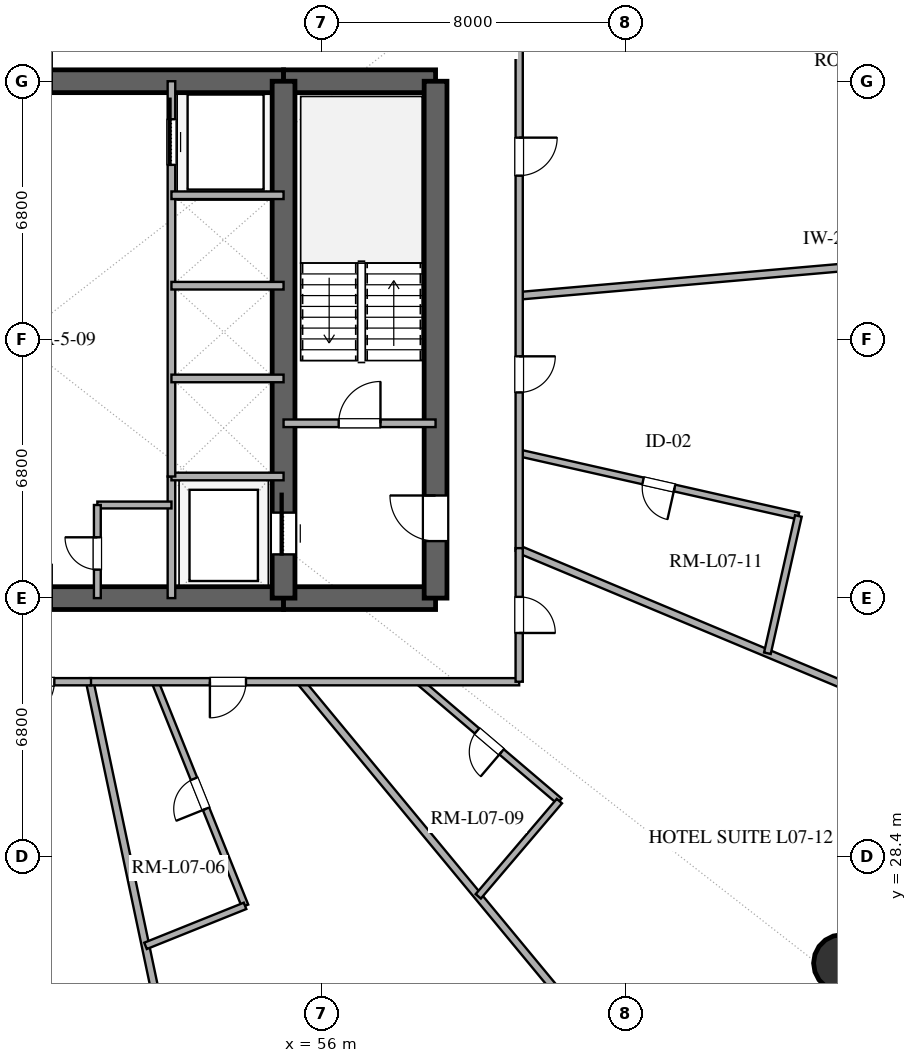
"""IFC4 building model, lengths in metres.
Left out: names, types, materials, properties, quantities, classifications, styles, units other than length and angle.
Written with IfcOpenShell. Run it as: python <this file> out.ifc"""

import sys

from ifc_helpers import new_model, si_unit, direction, frame, frame_2d, origin, origin_2d, place, context, subcontext, project, spatial, rectangle, hollow_circle, extrude, element, fill, save


model = new_model("IFC4")
c1 = context("Model", 3, precision=1e-05, world=origin(), true_north=direction((0.0, 1.0)))
c2 = subcontext(c1, "Body", "Model", "MODEL_VIEW")
j1 = project(units=[si_unit("LENGTHUNIT", "METRE"), si_unit("PLANEANGLEUNIT", "RADIAN")], contexts=[c1])
p1 = place(None, origin())
s1 = spatial("IfcSite", under=j1, at=p1, CompositionType="ELEMENT")
p2 = place(p1, origin())
s2 = spatial("IfcBuilding", under=s1, at=p2, CompositionType="ELEMENT")
p3 = place(p2, frame((0.0, 0.0, 35.4)))
s3 = spatial("IfcBuildingStorey", under=s2, at=p3, CompositionType="ELEMENT", Elevation=35.4)
p4 = place(p3, frame((41.0, 35.2, 0.0), z_axis=(0.0, 0.0, 1.0), x_axis=(1.0, 0.0, 0.0)))
e1 = element("IfcWall", 1, at=p4, inside=s3, PredefinedType="SHEAR", context=c2, shape_type="SweptSolid", body=[
    extrude(rectangle(XDim=14.0, YDim=0.6, at=frame_2d((7.0, 0.0))), origin(), (0.0, 0.0, 1.0), 3.38),
])
p5 = place(p4, frame((6.1, 0.0, 0.0)))
e2 = element("IfcOpeningElement", 2, at=p5, cuts=e1, PredefinedType="OPENING", context=c2, shape_type="SweptSolid", body=[
    extrude(rectangle(XDim=1.8, YDim=2.25, at=frame_2d((0.9, 1.125))), frame((0.0, 0.31, 0.0), z_axis=(0.0, -1.0, 0.0), x_axis=(1.0, 0.0, 0.0)), (0.0, 0.0, 1.0), 0.62),
])
p6 = place(p3, frame((55.0, 35.2, 0.0), z_axis=(0.0, 0.0, 1.0), x_axis=(1.0, 0.0, 0.0)))
e3 = element("IfcWall", 3, at=p6, inside=s3, PredefinedType="SHEAR", context=c2, shape_type="SweptSolid", body=[
    extrude(rectangle(XDim=4.0, YDim=0.6, at=frame_2d((2.0, 0.0))), origin(), (0.0, 0.0, 1.0), 3.38),
])
p7 = place(p3, frame((41.0, 48.8, 0.0), z_axis=(0.0, 0.0, 1.0), x_axis=(1.0, 0.0, 0.0)))
e4 = element("IfcWall", 4, at=p7, inside=s3, PredefinedType="SHEAR", context=c2, shape_type="SweptSolid", body=[
    extrude(rectangle(XDim=14.0, YDim=0.6, at=frame_2d((7.0, 0.0))), origin(), (0.0, 0.0, 1.0), 3.38),
])
p8 = place(p7, frame((6.1, 0.0, 0.0)))
e5 = element("IfcOpeningElement", 5, at=p8, cuts=e4, PredefinedType="OPENING", context=c2, shape_type="SweptSolid", body=[
    extrude(rectangle(XDim=1.8, YDim=2.25, at=frame_2d((0.9, 1.125))), frame((0.0, 0.31, 0.0), z_axis=(0.0, -1.0, 0.0), x_axis=(1.0, 0.0, 0.0)), (0.0, 0.0, 1.0), 0.62),
])
p9 = place(p3, frame((55.0, 48.8, 0.0), z_axis=(0.0, 0.0, 1.0), x_axis=(1.0, 0.0, 0.0)))
e6 = element("IfcWall", 6, at=p9, inside=s3, PredefinedType="SHEAR", context=c2, shape_type="SweptSolid", body=[
    extrude(rectangle(XDim=4.0, YDim=0.6, at=frame_2d((2.0, 0.0))), origin(), (0.0, 0.0, 1.0), 3.38),
])
p10 = place(p3, frame((59.0, 35.2, 0.0), z_axis=(0.0, 0.0, 1.0), x_axis=(0.0, 1.0, 0.0)))
e7 = element("IfcWall", 7, at=p10, inside=s3, PredefinedType="SHEAR", context=c2, shape_type="SweptSolid", body=[
    extrude(rectangle(XDim=13.6, YDim=0.6, at=frame_2d((6.8, 0.0))), origin(), (0.0, 0.0, 1.0), 3.38),
])
p11 = place(p10, frame((1.5, 0.0, 0.0)))
e8 = element("IfcOpeningElement", 8, at=p11, cuts=e7, PredefinedType="OPENING", context=c2, shape_type="SweptSolid", body=[
    extrude(rectangle(XDim=1.2, YDim=2.15, at=frame_2d((0.6, 1.075))), frame((0.0, 0.31, 0.0), z_axis=(0.0, -1.0, 0.0), x_axis=(1.0, 0.0, 0.0)), (0.0, 0.0, 1.0), 0.62),
])
p12 = place(p3, frame((55.0, 35.2, 0.0), z_axis=(0.0, 0.0, 1.0), x_axis=(0.0, 1.0, 0.0)))
e9 = element("IfcWall", 9, at=p12, inside=s3, PredefinedType="SHEAR", context=c2, shape_type="SweptSolid", body=[
    extrude(rectangle(XDim=13.6, YDim=0.6, at=frame_2d((6.8, 0.0))), origin(), (0.0, 0.0, 1.0), 3.38),
])
p13 = place(p12, frame((1.15, 0.0, 0.0)))
e10 = element("IfcOpeningElement", 10, at=p13, cuts=e9, PredefinedType="OPENING", context=c2, shape_type="SweptSolid", body=[
    extrude(rectangle(XDim=1.1, YDim=2.2, at=frame_2d((0.55, 1.1))), frame((0.0, 0.31, 0.0), z_axis=(0.0, -1.0, 0.0), x_axis=(1.0, 0.0, 0.0)), (0.0, 0.0, 1.0), 0.62),
])
p14 = place(p3, frame((69.697, 25.595, 0.0), z_axis=(0.0, 0.0, 1.0), x_axis=(1.0, 0.0, 0.0)))
e11 = element("IfcColumn", 11, at=p14, inside=s3, PredefinedType="COLUMN", context=c2, shape_type="SweptSolid", body=[
    extrude(hollow_circle(Radius=0.75, WallThickness=0.04, at=origin_2d()), origin(), (0.0, 0.0, 1.0), 3.38),
])
p15 = place(p3, frame((55.0, 39.8, 0.0), z_axis=(0.0, 0.0, 1.0), x_axis=(1.0, 0.0, 0.0)))
e12 = element("IfcWall", 12, at=p15, inside=s3, PredefinedType="SOLIDWALL", context=c2, shape_type="SweptSolid", body=[
    extrude(rectangle(XDim=4.0, YDim=0.2, at=frame_2d((2.0, 0.0))), origin(), (0.0, 0.0, 1.0), 2.74),
])
p16 = place(p15, frame((1.45, 0.0, 0.0)))
e13 = element("IfcOpeningElement", 13, at=p16, cuts=e12, PredefinedType="OPENING", context=c2, shape_type="SweptSolid", body=[
    extrude(rectangle(XDim=1.1, YDim=2.15, at=frame_2d((0.55, 1.075))), frame((0.0, 0.11, 0.0), z_axis=(0.0, -1.0, 0.0), x_axis=(1.0, 0.0, 0.0)), (0.0, 0.0, 1.0), 0.22),
])
p17 = place(p3, frame((52.05, 35.2, 0.0), z_axis=(0.0, 0.0, 1.0), x_axis=(0.0, 1.0, 0.0)))
e14 = element("IfcWall", 14, at=p17, inside=s3, PredefinedType="SOLIDWALL", context=c2, shape_type="SweptSolid", body=[
    extrude(rectangle(XDim=3.2, YDim=0.2, at=frame_2d((1.6, 0.0))), origin(), (0.0, 0.0, 1.0), 2.74),
])
p18 = place(p3, frame((52.05, 38.4, 0.0), z_axis=(0.0, 0.0, 1.0), x_axis=(1.0, 0.0, 0.0)))
e15 = element("IfcWall", 15, at=p18, inside=s3, PredefinedType="SOLIDWALL", context=c2, shape_type="SweptSolid", body=[
    extrude(rectangle(XDim=2.95, YDim=0.2, at=frame_2d((1.475, 0.0))), origin(), (0.0, 0.0, 1.0), 2.74),
])
p19 = place(p3, frame((52.05, 38.4, 0.0), z_axis=(0.0, 0.0, 1.0), x_axis=(0.0, 1.0, 0.0)))
e16 = element("IfcWall", 16, at=p19, inside=s3, PredefinedType="SOLIDWALL", context=c2, shape_type="SweptSolid", body=[
    extrude(rectangle(XDim=10.4, YDim=0.2, at=frame_2d((5.2, 0.0))), origin(), (0.0, 0.0, 1.0), 2.74),
])
p20 = place(p19, frame((8.2, 0.0, 0.0)))
e17 = element("IfcOpeningElement", 17, at=p20, cuts=e16, PredefinedType="OPENING", context=c2, shape_type="SweptSolid", body=[
    extrude(rectangle(XDim=1.2, YDim=2.2, at=frame_2d((0.6, 1.1))), frame((0.0, 0.11, 0.0), z_axis=(0.0, -1.0, 0.0), x_axis=(1.0, 0.0, 0.0)), (0.0, 0.0, 1.0), 0.22),
])
for number, where, z_axis, x_axis in (
    (18, (52.05, 40.98, 0.0), (0.0, 0.0, 1.0), (1.0, 0.0, 0.0)),
    (19, (52.05, 43.42, 0.0), (0.0, 0.0, 1.0), (1.0, 0.0, 0.0)),
    (20, (52.05, 45.8, 0.0), (0.0, 0.0, 1.0), (1.0, 0.0, 0.0)),
):
    element("IfcWall", number, at=place(p3, frame(where, z_axis=z_axis, x_axis=x_axis)), inside=s3, PredefinedType="SOLIDWALL", context=c2, shape_type="SweptSolid", body=[
        extrude(rectangle(XDim=2.95, YDim=0.2, at=frame_2d((1.475, 0.0))), origin(), (0.0, 0.0, 1.0), 2.74),
    ])
p21 = place(p3, frame((50.1, 37.65, 0.0), z_axis=(0.0, 0.0, 1.0), x_axis=(1.0, 0.0, 0.0)))
e21 = element("IfcWall", 21, at=p21, inside=s3, PredefinedType="PLUMBINGWALL", context=c2, shape_type="SweptSolid", body=[
    extrude(rectangle(XDim=1.95, YDim=0.18, at=frame_2d((0.975, 0.0))), origin(), (0.0, 0.0, 1.0), 2.74),
])
p22 = place(p3, frame((50.1, 35.2, 0.0), z_axis=(0.0, 0.0, 1.0), x_axis=(0.0, 1.0, 0.0)))
e22 = element("IfcWall", 22, at=p22, inside=s3, PredefinedType="PLUMBINGWALL", context=c2, shape_type="SweptSolid", body=[
    extrude(rectangle(XDim=2.45, YDim=0.18, at=frame_2d((1.225, 0.0))), origin(), (0.0, 0.0, 1.0), 2.74),
])
p23 = place(p22, frame((0.75, 0.0, 0.0)))
e23 = element("IfcOpeningElement", 23, at=p23, cuts=e22, PredefinedType="OPENING", context=c2, shape_type="SweptSolid", body=[
    extrude(rectangle(XDim=0.85, YDim=2.1, at=frame_2d((0.425, 1.05))), frame((0.0, 0.1, 0.0), z_axis=(0.0, -1.0, 0.0), x_axis=(1.0, 0.0, 0.0)), (0.0, 0.0, 1.0), 0.2),
])
p24 = place(p3, frame((61.2, 43.155, 0.0), z_axis=(0.0, 0.0, 1.0), x_axis=(0.996194943742, 0.087152934912, 0.0)))
e24 = element("IfcWall", 24, at=p24, inside=s3, PredefinedType="PARTITIONING", context=c2, shape_type="SweptSolid", body=[
    extrude(rectangle(XDim=17.071, YDim=0.2, at=frame_2d((8.536, 0.0))), origin(), (0.0, 0.0, 1.0), 2.74),
])
p25 = place(p3, frame((61.2, 36.48, 0.0), z_axis=(0.0, 0.0, 1.0), x_axis=(0.922585702004, -0.385792201136, 0.0)))
e25 = element("IfcWall", 25, at=p25, inside=s3, PredefinedType="PARTITIONING", context=c2, shape_type="SweptSolid", body=[
    extrude(rectangle(XDim=14.918, YDim=0.2, at=frame_2d((7.459, 0.0))), origin(), (0.0, 0.0, 1.0), 2.74),
])
p26 = place(p3, frame((68.547, 37.361, 0.0), z_axis=(0.0, 0.0, 1.0), x_axis=(-0.975442349969, 0.220254902072, 0.0)))
e26 = element("IfcWall", 26, at=p26, inside=s3, PredefinedType="PLUMBINGWALL", context=c2, shape_type="SweptSolid", body=[
    extrude(rectangle(XDim=7.532, YDim=0.18, at=frame_2d((3.766, 0.0))), origin(), (0.0, 0.0, 1.0), 2.74),
])
p27 = place(p26, frame((3.341, 0.0, 0.0)))
e27 = element("IfcOpeningElement", 27, at=p27, cuts=e26, PredefinedType="OPENING", context=c2, shape_type="SweptSolid", body=[
    extrude(rectangle(XDim=0.85, YDim=2.1, at=frame_2d((0.425, 1.05))), frame((0.0, 0.1, 0.0), z_axis=(0.0, -1.0, 0.0), x_axis=(1.0, 0.0, 0.0)), (0.0, 0.0, 1.0), 0.2),
])
p28 = place(p3, frame((49.9, 33.0, 0.0), z_axis=(0.0, 0.0, 1.0), x_axis=(0.206598790959, -0.97842574556, 0.0)))
e28 = element("IfcWall", 28, at=p28, inside=s3, PredefinedType="PARTITIONING", context=c2, shape_type="SweptSolid", body=[
    extrude(rectangle(XDim=14.576, YDim=0.2, at=frame_2d((7.288, 0.0))), origin(), (0.0, 0.0, 1.0), 2.74),
])
p29 = place(p3, frame((61.2, 51.0, 0.0), z_axis=(0.0, 0.0, 1.0), x_axis=(0.0, -1.0, 0.0)))
e29 = element("IfcWall", 29, at=p29, inside=s3, PredefinedType="PARTITIONING", context=c2, shape_type="SweptSolid", body=[
    extrude(rectangle(XDim=14.554, YDim=0.19, at=frame_2d((7.277, 0.0))), origin(), (0.0, 0.0, 1.0), 2.74),
])
p30 = place(p29, frame((3.684, 0.0, 0.0)))
e30 = element("IfcOpeningElement", 30, at=p30, cuts=e29, PredefinedType="OPENING", context=c2, shape_type="SweptSolid", body=[
    extrude(rectangle(XDim=1.0, YDim=2.2, at=frame_2d((0.5, 1.1))), frame((0.0, 0.105, 0.0), z_axis=(0.0, -1.0, 0.0), x_axis=(1.0, 0.0, 0.0)), (0.0, 0.0, 1.0), 0.21),
])
p31 = place(p29, frame((9.438, 0.0, 0.0)))
e31 = element("IfcOpeningElement", 31, at=p31, cuts=e29, PredefinedType="OPENING", context=c2, shape_type="SweptSolid", body=[
    extrude(rectangle(XDim=0.95, YDim=2.15, at=frame_2d((0.475, 1.075))), frame((0.0, 0.105, 0.0), z_axis=(0.0, -1.0, 0.0), x_axis=(1.0, 0.0, 0.0)), (0.0, 0.0, 1.0), 0.21),
])
p32 = place(p3, frame((55.449, 33.0, 0.0), z_axis=(0.0, 0.0, 1.0), x_axis=(0.637638501905, -0.770335732579, 0.0)))
e32 = element("IfcWall", 32, at=p32, inside=s3, PredefinedType="PARTITIONING", context=c2, shape_type="SweptSolid", body=[
    extrude(rectangle(XDim=14.187, YDim=0.2, at=frame_2d((7.094, 0.0))), origin(), (0.0, 0.0, 1.0), 2.74),
])
p33 = place(p3, frame((53.987, 27.102, 0.0), z_axis=(0.0, 0.0, 1.0), x_axis=(-0.37285379951, 0.927890103509, 0.0)))
e33 = element("IfcWall", 33, at=p33, inside=s3, PredefinedType="PLUMBINGWALL", context=c2, shape_type="SweptSolid", body=[
    extrude(rectangle(XDim=6.356, YDim=0.18, at=frame_2d((3.178, 0.0))), origin(), (0.0, 0.0, 1.0), 2.74),
])
p34 = place(p33, frame((2.753, 0.0, 0.0)))
e34 = element("IfcOpeningElement", 34, at=p34, cuts=e33, PredefinedType="OPENING", context=c2, shape_type="SweptSolid", body=[
    extrude(rectangle(XDim=0.85, YDim=2.1, at=frame_2d((0.425, 1.05))), frame((0.0, 0.1, 0.0), z_axis=(0.0, -1.0, 0.0), x_axis=(1.0, 0.0, 0.0)), (0.0, 0.0, 1.0), 0.2),
])
p35 = place(p3, frame((62.258, 29.859, 0.0), z_axis=(0.0, 0.0, 1.0), x_axis=(-0.761358380859, 0.648331254758, 0.0)))
e35 = element("IfcWall", 35, at=p35, inside=s3, PredefinedType="PLUMBINGWALL", context=c2, shape_type="SweptSolid", body=[
    extrude(rectangle(XDim=4.845, YDim=0.18, at=frame_2d((2.422, 0.0))), origin(), (0.0, 0.0, 1.0), 2.74),
])
p36 = place(p35, frame((1.997, 0.0, 0.0)))
e36 = element("IfcOpeningElement", 36, at=p36, cuts=e35, PredefinedType="OPENING", context=c2, shape_type="SweptSolid", body=[
    extrude(rectangle(XDim=0.85, YDim=2.1, at=frame_2d((0.425, 1.05))), frame((0.0, 0.1, 0.0), z_axis=(0.0, -1.0, 0.0), x_axis=(1.0, 0.0, 0.0)), (0.0, 0.0, 1.0), 0.2),
])
p37 = place(p3, frame((61.2, 33.0, 0.0), z_axis=(0.0, 0.0, 1.0), x_axis=(-1.0, 0.0, 0.0)))
e37 = element("IfcWall", 37, at=p37, inside=s3, PredefinedType="PARTITIONING", context=c2, shape_type="SweptSolid", body=[
    extrude(rectangle(XDim=11.3, YDim=0.19, at=frame_2d((5.65, 0.0))), origin(), (0.0, 0.0, 1.0), 2.74),
])
p38 = place(p37, frame((7.188, 0.0, 0.0)))
e38 = element("IfcOpeningElement", 38, at=p38, cuts=e37, PredefinedType="OPENING", context=c2, shape_type="SweptSolid", body=[
    extrude(rectangle(XDim=0.95, YDim=2.15, at=frame_2d((0.475, 1.075))), frame((0.0, 0.105, 0.0), z_axis=(0.0, -1.0, 0.0), x_axis=(1.0, 0.0, 0.0)), (0.0, 0.0, 1.0), 0.21),
])
p39 = place(p3, frame((67.731, 33.749, 0.0), z_axis=(0.0, 0.0, 1.0), x_axis=(0.220238608567, 0.9754460289, 0.0)))
e39 = element("IfcWall", 39, at=p39, inside=s3, PredefinedType="PLUMBINGWALL", context=c2, shape_type="SweptSolid", body=[
    extrude(rectangle(XDim=3.702, YDim=0.18, at=frame_2d((1.851, 0.0))), origin(), (0.0, 0.0, 1.0), 2.74),
])
p40 = place(p3, frame((61.2, 36.515, 0.0), z_axis=(0.0, 0.0, 1.0), x_axis=(0.0, -1.0, 0.0)))
e40 = element("IfcWall", 40, at=p40, inside=s3, PredefinedType="PARTITIONING", context=c2, shape_type="SweptSolid", body=[
    extrude(rectangle(XDim=3.515, YDim=0.19, at=frame_2d((1.758, 0.0))), origin(), (0.0, 0.0, 1.0), 2.74),
])
p41 = place(p40, frame((1.282, 0.0, 0.0)))
e41 = element("IfcOpeningElement", 41, at=p41, cuts=e40, PredefinedType="OPENING", context=c2, shape_type="SweptSolid", body=[
    extrude(rectangle(XDim=0.95, YDim=2.15, at=frame_2d((0.475, 1.075))), frame((0.0, 0.105, 0.0), z_axis=(0.0, -1.0, 0.0), x_axis=(1.0, 0.0, 0.0)), (0.0, 0.0, 1.0), 0.21),
])
p42 = place(p3, frame((60.124, 27.353, 0.0), z_axis=(0.0, 0.0, 1.0), x_axis=(0.648326357453, 0.76136255111, 0.0)))
e42 = element("IfcWall", 42, at=p42, inside=s3, PredefinedType="PLUMBINGWALL", context=c2, shape_type="SweptSolid", body=[
    extrude(rectangle(XDim=3.292, YDim=0.18, at=frame_2d((1.646, 0.0))), origin(), (0.0, 0.0, 1.0), 2.74),
])
p43 = place(p3, frame((49.933, 33.0, 0.0), z_axis=(0.0, 0.0, 1.0), x_axis=(-1.0, 0.0, 0.0)))
e43 = element("IfcWall", 43, at=p43, inside=s3, PredefinedType="PARTITIONING", context=c2, shape_type="SweptSolid", body=[
    extrude(rectangle(XDim=2.879, YDim=0.19, at=frame_2d((1.44, 0.0))), origin(), (0.0, 0.0, 1.0), 2.74),
])
p44 = place(p43, frame((0.965, 0.0, 0.0)))
e44 = element("IfcOpeningElement", 44, at=p44, cuts=e43, PredefinedType="OPENING", context=c2, shape_type="SweptSolid", body=[
    extrude(rectangle(XDim=0.95, YDim=2.15, at=frame_2d((0.475, 1.075))), frame((0.0, 0.105, 0.0), z_axis=(0.0, -1.0, 0.0), x_axis=(1.0, 0.0, 0.0)), (0.0, 0.0, 1.0), 0.21),
])
p45 = place(p3, frame((51.368, 26.05, 0.0), z_axis=(0.0, 0.0, 1.0), x_axis=(0.927890861741, 0.372851912558, 0.0)))
e45 = element("IfcWall", 45, at=p45, inside=s3, PredefinedType="PLUMBINGWALL", context=c2, shape_type="SweptSolid", body=[
    extrude(rectangle(XDim=2.822, YDim=0.18, at=frame_2d((1.411, 0.0))), origin(), (0.0, 0.0, 1.0), 2.74),
])
p46 = place(p13, origin())
e46 = element("IfcDoor", 46, at=p46, inside=s3, OperationType="SLIDING_TO_RIGHT", PredefinedType="DOOR", context=c2, shape_type="SweptSolid", body=[
    extrude(rectangle(XDim=1.1, YDim=2.2, at=frame_2d((0.55, 1.1))), frame((0.0, 0.025, 0.0), z_axis=(0.0, -1.0, 0.0), x_axis=(1.0, 0.0, 0.0)), (0.0, 0.0, 1.0), 0.05),
])
fill(e10, e46)
p47 = place(p11, origin())
e47 = element("IfcDoor", 47, at=p47, inside=s3, OperationType="SINGLE_SWING_RIGHT", PredefinedType="DOOR", context=c2, shape_type="SweptSolid", body=[
    extrude(rectangle(XDim=1.2, YDim=2.15, at=frame_2d((0.6, 1.075))), frame((0.0, 0.025, 0.0), z_axis=(0.0, -1.0, 0.0), x_axis=(1.0, 0.0, 0.0)), (0.0, 0.0, 1.0), 0.05),
])
fill(e8, e47)
p48 = place(p16, origin())
e48 = element("IfcDoor", 48, at=p48, inside=s3, OperationType="SINGLE_SWING_RIGHT", PredefinedType="DOOR", context=c2, shape_type="SweptSolid", body=[
    extrude(rectangle(XDim=1.1, YDim=2.15, at=frame_2d((0.55, 1.075))), frame((0.0, 0.025, 0.0), z_axis=(0.0, -1.0, 0.0), x_axis=(1.0, 0.0, 0.0)), (0.0, 0.0, 1.0), 0.05),
])
fill(e13, e48)
p49 = place(p20, origin())
e49 = element("IfcDoor", 49, at=p49, inside=s3, OperationType="SLIDING_TO_RIGHT", PredefinedType="DOOR", context=c2, shape_type="SweptSolid", body=[
    extrude(rectangle(XDim=1.2, YDim=2.2, at=frame_2d((0.6, 1.1))), frame((0.0, 0.025, 0.0), z_axis=(0.0, -1.0, 0.0), x_axis=(1.0, 0.0, 0.0)), (0.0, 0.0, 1.0), 0.05),
])
fill(e17, e49)
p50 = place(p23, origin())
e50 = element("IfcDoor", 50, at=p50, inside=s3, OperationType="SINGLE_SWING_RIGHT", PredefinedType="DOOR", context=c2, shape_type="SweptSolid", body=[
    extrude(rectangle(XDim=0.85, YDim=2.1, at=frame_2d((0.425, 1.05))), frame((0.0, 0.025, 0.0), z_axis=(0.0, -1.0, 0.0), x_axis=(1.0, 0.0, 0.0)), (0.0, 0.0, 1.0), 0.05),
])
fill(e23, e50)
p51 = place(p27, origin())
e51 = element("IfcDoor", 51, at=p51, inside=s3, OperationType="SINGLE_SWING_LEFT", PredefinedType="DOOR", context=c2, shape_type="SweptSolid", body=[
    extrude(rectangle(XDim=0.85, YDim=2.1, at=frame_2d((0.425, 1.05))), frame((0.0, 0.025, 0.0), z_axis=(0.0, -1.0, 0.0), x_axis=(1.0, 0.0, 0.0)), (0.0, 0.0, 1.0), 0.05),
])
fill(e27, e51)
p52 = place(p30, origin())
e52 = element("IfcDoor", 52, at=p52, inside=s3, OperationType="SINGLE_SWING_LEFT", PredefinedType="DOOR", context=c2, shape_type="SweptSolid", body=[
    extrude(rectangle(XDim=1.0, YDim=2.2, at=frame_2d((0.5, 1.1))), frame((0.0, 0.025, 0.0), z_axis=(0.0, -1.0, 0.0), x_axis=(1.0, 0.0, 0.0)), (0.0, 0.0, 1.0), 0.05),
])
fill(e30, e52)
p53 = place(p31, origin())
e53 = element("IfcDoor", 53, at=p53, inside=s3, OperationType="SINGLE_SWING_LEFT", PredefinedType="DOOR", context=c2, shape_type="SweptSolid", body=[
    extrude(rectangle(XDim=0.95, YDim=2.15, at=frame_2d((0.475, 1.075))), frame((0.0, 0.025, 0.0), z_axis=(0.0, -1.0, 0.0), x_axis=(1.0, 0.0, 0.0)), (0.0, 0.0, 1.0), 0.05),
])
fill(e31, e53)
p54 = place(p34, origin())
e54 = element("IfcDoor", 54, at=p54, inside=s3, OperationType="SINGLE_SWING_LEFT", PredefinedType="DOOR", context=c2, shape_type="SweptSolid", body=[
    extrude(rectangle(XDim=0.85, YDim=2.1, at=frame_2d((0.425, 1.05))), frame((0.0, 0.025, 0.0), z_axis=(0.0, -1.0, 0.0), x_axis=(1.0, 0.0, 0.0)), (0.0, 0.0, 1.0), 0.05),
])
fill(e34, e54)
p55 = place(p36, origin())
e55 = element("IfcDoor", 55, at=p55, inside=s3, OperationType="SINGLE_SWING_LEFT", PredefinedType="DOOR", context=c2, shape_type="SweptSolid", body=[
    extrude(rectangle(XDim=0.85, YDim=2.1, at=frame_2d((0.425, 1.05))), frame((0.0, 0.025, 0.0), z_axis=(0.0, -1.0, 0.0), x_axis=(1.0, 0.0, 0.0)), (0.0, 0.0, 1.0), 0.05),
])
fill(e36, e55)
p56 = place(p38, origin())
e56 = element("IfcDoor", 56, at=p56, inside=s3, OperationType="SINGLE_SWING_RIGHT", PredefinedType="DOOR", context=c2, shape_type="SweptSolid", body=[
    extrude(rectangle(XDim=0.95, YDim=2.15, at=frame_2d((0.475, 1.075))), frame((0.0, 0.025, 0.0), z_axis=(0.0, -1.0, 0.0), x_axis=(1.0, 0.0, 0.0)), (0.0, 0.0, 1.0), 0.05),
])
fill(e38, e56)
p57 = place(p41, origin())
e57 = element("IfcDoor", 57, at=p57, inside=s3, OperationType="SINGLE_SWING_RIGHT", PredefinedType="DOOR", context=c2, shape_type="SweptSolid", body=[
    extrude(rectangle(XDim=0.95, YDim=2.15, at=frame_2d((0.475, 1.075))), frame((0.0, 0.025, 0.0), z_axis=(0.0, -1.0, 0.0), x_axis=(1.0, 0.0, 0.0)), (0.0, 0.0, 1.0), 0.05),
])
fill(e41, e57)
p58 = place(p44, origin())
e58 = element("IfcDoor", 58, at=p58, inside=s3, OperationType="SINGLE_SWING_RIGHT", PredefinedType="DOOR", context=c2, shape_type="SweptSolid", body=[
    extrude(rectangle(XDim=0.95, YDim=2.15, at=frame_2d((0.475, 1.075))), frame((0.0, 0.025, 0.0), z_axis=(0.0, -1.0, 0.0), x_axis=(1.0, 0.0, 0.0)), (0.0, 0.0, 1.0), 0.05),
])
fill(e44, e58)
save(model, sys.argv[1])
